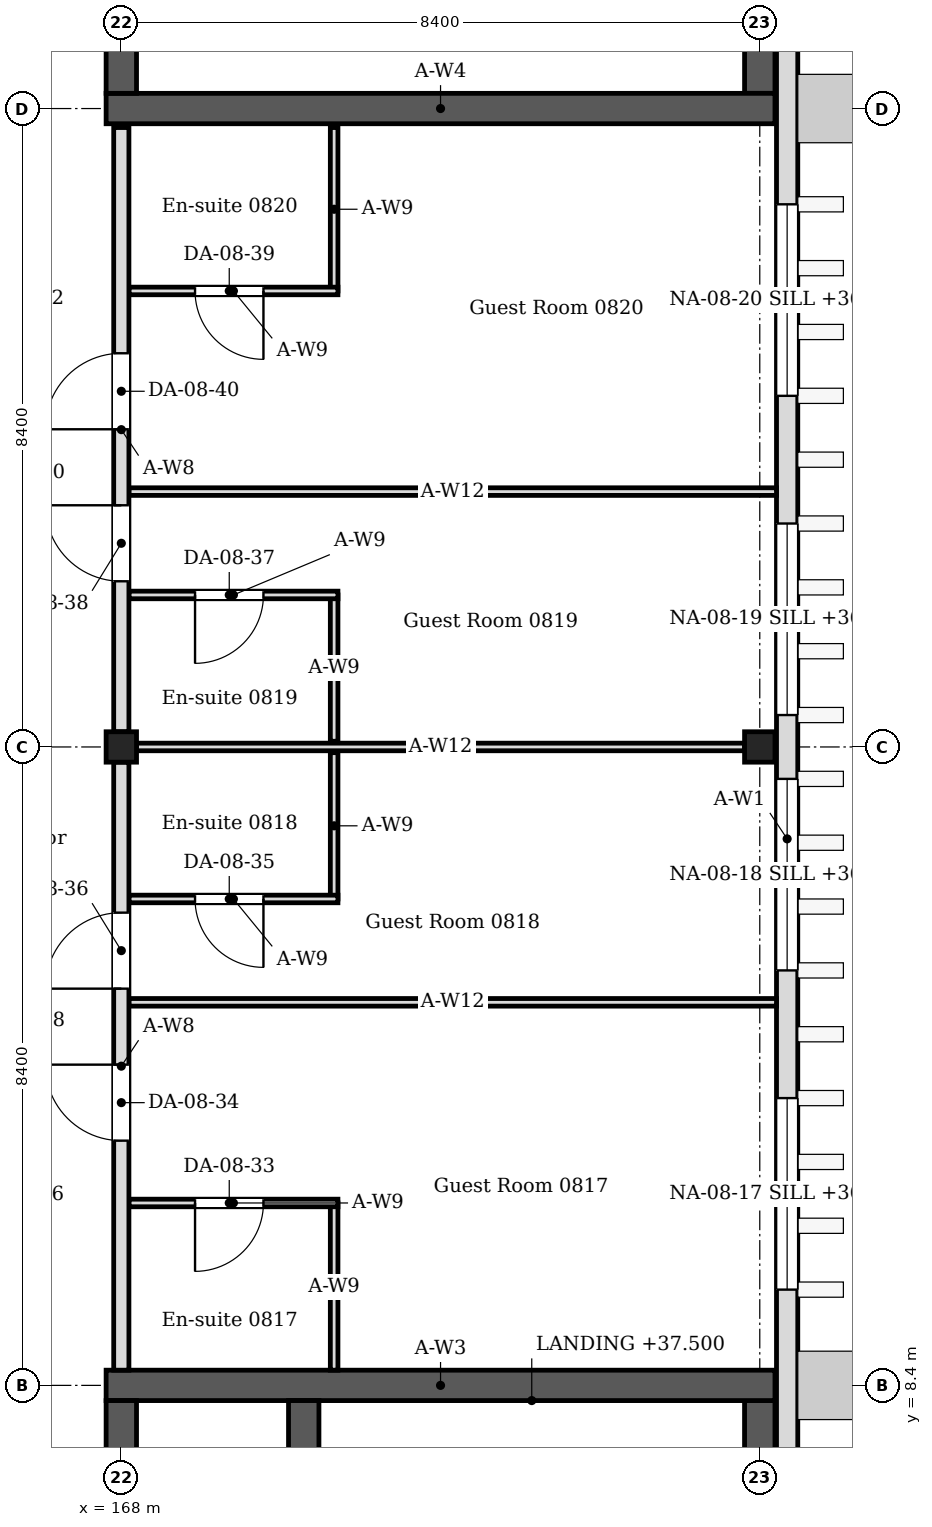
"""IFC4 building model, lengths in metres.
Left out: names, types, materials, properties, quantities, classifications, styles, units other than length and angle.
Written with IfcOpenShell. Run it as: python <this file> out.ifc"""

import sys

from ifc_helpers import new_model, si_unit, direction, frame, frame_2d, origin, origin_2d, place, context, subcontext, project, spatial, rectangle, i_section, extrude, element, fill, save


model = new_model("IFC4")
c1 = context("Model", 3, precision=1e-05, world=origin(), true_north=direction((0.0, 1.0)))
c2 = subcontext(c1, "Body", "Model", "MODEL_VIEW")
j1 = project(units=[si_unit("LENGTHUNIT", "METRE"), si_unit("PLANEANGLEUNIT", "RADIAN")], contexts=[c1])
p1 = place(None, origin())
s1 = spatial("IfcSite", under=j1, at=p1, CompositionType="ELEMENT")
p2 = place(p1, origin())
s2 = spatial("IfcBuilding", under=s1, at=p2, CompositionType="ELEMENT")
p3 = place(p2, frame((0.0, 0.0, 35.4)))
s3 = spatial("IfcBuildingStorey", under=s2, at=p3, CompositionType="ELEMENT", Elevation=35.4)
for number, where, z_axis, x_axis in (
    (1, (168.0, 16.8, 0.0), (0.0, 0.0, 1.0), (1.0, 0.0, 0.0)),
    (2, (176.4, 16.8, 0.0), (0.0, 0.0, 1.0), (1.0, 0.0, 0.0)),
):
    element("IfcColumn", number, at=place(p3, frame(where, z_axis=z_axis, x_axis=x_axis)), inside=s3, PredefinedType="COLUMN", context=c2, shape_type="SweptSolid", body=[
        extrude(i_section(OverallWidth=0.4, OverallDepth=0.4, WebThickness=0.013, FlangeThickness=0.021, FilletRadius=0.022, at=origin_2d()), origin(), (0.0, 0.0, 1.0), 4.2),
    ])
p4 = place(p3, frame((167.8, 8.4, 0.0), z_axis=(0.0, 0.0, 1.0), x_axis=(1.0, 0.0, 0.0)))
e3 = element("IfcWall", 3, at=p4, inside=s3, PredefinedType="SOLIDWALL", context=c2, shape_type="SweptSolid", body=[
    extrude(rectangle(XDim=8.8, YDim=0.4, at=frame_2d((4.4, 0.0))), origin(), (0.0, 0.0, 1.0), 4.05),
])
p5 = place(p3, frame((168.0, 0.2, 0.0), z_axis=(0.0, 0.0, 1.0), x_axis=(0.0, 1.0, 0.0)))
e4 = element("IfcWall", 4, at=p5, inside=s3, PredefinedType="SOLIDWALL", context=c2, shape_type="SweptSolid", body=[
    extrude(rectangle(XDim=8.0, YDim=0.4, at=frame_2d((4.0, 0.0))), origin(), (0.0, 0.0, 1.0), 4.05),
])
p6 = place(p5, frame((1.75, 0.0, 0.0)))
e5 = element("IfcOpeningElement", 5, at=p6, cuts=e4, PredefinedType="OPENING", context=c2, shape_type="SweptSolid", body=[
    extrude(rectangle(XDim=1.0, YDim=2.1, at=frame_2d((0.5, 1.05))), frame((0.0, 0.21, 0.0), z_axis=(0.0, -1.0, 0.0), x_axis=(1.0, 0.0, 0.0)), (0.0, 0.0, 1.0), 0.42),
])
p7 = place(p5, frame((5.675, 0.0, 0.0)))
e6 = element("IfcOpeningElement", 6, at=p7, cuts=e4, PredefinedType="OPENING", context=c2, shape_type="SweptSolid", body=[
    extrude(rectangle(XDim=1.05, YDim=2.1, at=frame_2d((0.525, 1.05))), frame((0.0, 0.21, 0.0), z_axis=(0.0, -1.0, 0.0), x_axis=(1.0, 0.0, 0.0)), (0.0, 0.0, 1.0), 0.42),
])
p8 = place(p3, frame((176.4, 0.2, 0.0), z_axis=(0.0, 0.0, 1.0), x_axis=(0.0, 1.0, 0.0)))
e7 = element("IfcWall", 7, at=p8, inside=s3, PredefinedType="SOLIDWALL", context=c2, shape_type="SweptSolid", body=[
    extrude(rectangle(XDim=8.0, YDim=0.4, at=frame_2d((4.0, 0.0))), origin(), (0.0, 0.0, 1.0), 4.05),
])
p9 = place(p3, frame((167.8, 25.2, 0.0), z_axis=(0.0, 0.0, 1.0), x_axis=(1.0, 0.0, 0.0)))
e8 = element("IfcWall", 8, at=p9, inside=s3, PredefinedType="SOLIDWALL", context=c2, shape_type="SweptSolid", body=[
    extrude(rectangle(XDim=8.8, YDim=0.4, at=frame_2d((4.4, 0.0))), origin(), (0.0, 0.0, 1.0), 4.05),
])
p10 = place(p3, frame((168.0, 25.4, 0.0), z_axis=(0.0, 0.0, 1.0), x_axis=(0.0, 1.0, 0.0)))
e9 = element("IfcWall", 9, at=p10, inside=s3, PredefinedType="SOLIDWALL", context=c2, shape_type="SweptSolid", body=[
    extrude(rectangle(XDim=16.4, YDim=0.4, at=frame_2d((8.2, 0.0))), origin(), (0.0, 0.0, 1.0), 4.05),
])
p11 = place(p10, frame((1.0, 0.0, 0.0)))
e10 = element("IfcOpeningElement", 10, at=p11, cuts=e9, PredefinedType="OPENING", context=c2, shape_type="SweptSolid", body=[
    extrude(rectangle(XDim=1.0, YDim=2.1, at=frame_2d((0.5, 1.05))), frame((0.0, 0.21, 0.0), z_axis=(0.0, -1.0, 0.0), x_axis=(1.0, 0.0, 0.0)), (0.0, 0.0, 1.0), 0.42),
])
p12 = place(p10, frame((14.4, 0.0, 0.0)))
e11 = element("IfcOpeningElement", 11, at=p12, cuts=e9, PredefinedType="OPENING", context=c2, shape_type="SweptSolid", body=[
    extrude(rectangle(XDim=1.4, YDim=2.1, at=frame_2d((0.7, 1.05))), frame((0.0, 0.21, 0.0), z_axis=(0.0, -1.0, 0.0), x_axis=(1.0, 0.0, 0.0)), (0.0, 0.0, 1.0), 0.42),
])
p13 = place(p3, frame((176.4, 25.4, 0.0), z_axis=(0.0, 0.0, 1.0), x_axis=(0.0, 1.0, 0.0)))
e12 = element("IfcWall", 12, at=p13, inside=s3, PredefinedType="SOLIDWALL", context=c2, shape_type="SweptSolid", body=[
    extrude(rectangle(XDim=16.4, YDim=0.4, at=frame_2d((8.2, 0.0))), origin(), (0.0, 0.0, 1.0), 4.05),
])
p14 = place(p3, frame((176.76, -0.22, 0.0), z_axis=(0.0, 0.0, 1.0), x_axis=(0.0, 1.0, 0.0)))
e13 = element("IfcWall", 13, at=p14, inside=s3, PredefinedType="SOLIDWALL", context=c2, shape_type="SweptSolid", body=[
    extrude(rectangle(XDim=42.57, YDim=0.28, at=frame_2d((21.285, 0.0))), origin(), (0.0, 0.0, 1.0), 4.05),
])
p15 = place(p14, frame((9.88, 0.0, 0.6)))
e14 = element("IfcOpeningElement", 14, at=p15, cuts=e13, PredefinedType="OPENING", context=c2, shape_type="SweptSolid", body=[
    extrude(rectangle(XDim=2.52, YDim=2.4, at=frame_2d((1.26, 1.2))), frame((0.0, 0.15, 0.0), z_axis=(0.0, -1.0, 0.0), x_axis=(1.0, 0.0, 0.0)), (0.0, 0.0, 1.0), 0.3),
])
p16 = place(p14, frame((14.08, 0.0, 0.6)))
e15 = element("IfcOpeningElement", 15, at=p16, cuts=e13, PredefinedType="OPENING", context=c2, shape_type="SweptSolid", body=[
    extrude(rectangle(XDim=2.52, YDim=2.4, at=frame_2d((1.26, 1.2))), frame((0.0, 0.15, 0.0), z_axis=(0.0, -1.0, 0.0), x_axis=(1.0, 0.0, 0.0)), (0.0, 0.0, 1.0), 0.3),
])
p17 = place(p14, frame((17.44, 0.0, 0.6)))
e16 = element("IfcOpeningElement", 16, at=p17, cuts=e13, PredefinedType="OPENING", context=c2, shape_type="SweptSolid", body=[
    extrude(rectangle(XDim=2.52, YDim=2.4, at=frame_2d((1.26, 1.2))), frame((0.0, 0.15, 0.0), z_axis=(0.0, -1.0, 0.0), x_axis=(1.0, 0.0, 0.0)), (0.0, 0.0, 1.0), 0.3),
])
p18 = place(p14, frame((21.64, 0.0, 0.6)))
e17 = element("IfcOpeningElement", 17, at=p18, cuts=e13, PredefinedType="OPENING", context=c2, shape_type="SweptSolid", body=[
    extrude(rectangle(XDim=2.52, YDim=2.4, at=frame_2d((1.26, 1.2))), frame((0.0, 0.15, 0.0), z_axis=(0.0, -1.0, 0.0), x_axis=(1.0, 0.0, 0.0)), (0.0, 0.0, 1.0), 0.3),
])
p19 = place(p3, frame((170.8, 8.6, 0.0), z_axis=(0.0, 0.0, 1.0), x_axis=(0.0, 1.0, 0.0)))
e18 = element("IfcWall", 18, at=p19, inside=s3, PredefinedType="PARTITIONING", context=c2, shape_type="SweptSolid", body=[
    extrude(rectangle(XDim=2.2, YDim=0.1, at=frame_2d((1.1, 0.0))), origin(), (0.0, 0.0, 1.0), 4.05),
])
p20 = place(p3, frame((170.85, 10.8, 0.0), z_axis=(0.0, 0.0, 1.0), x_axis=(-1.0, 0.0, 0.0)))
e19 = element("IfcWall", 19, at=p20, inside=s3, PredefinedType="PARTITIONING", context=c2, shape_type="SweptSolid", body=[
    extrude(rectangle(XDim=2.75, YDim=0.1, at=frame_2d((1.375, 0.0))), origin(), (0.0, 0.0, 1.0), 4.05),
])
p21 = place(p20, frame((0.98, 0.0, 0.0)))
e20 = element("IfcOpeningElement", 20, at=p21, cuts=e19, PredefinedType="OPENING", context=c2, shape_type="SweptSolid", body=[
    extrude(rectangle(XDim=0.9, YDim=2.1, at=frame_2d((0.45, 1.05))), frame((0.0, 0.06, 0.0), z_axis=(0.0, -1.0, 0.0), x_axis=(1.0, 0.0, 0.0)), (0.0, 0.0, 1.0), 0.12),
])
p22 = place(p3, frame((170.8, 14.8, 0.0), z_axis=(0.0, 0.0, 1.0), x_axis=(0.0, 1.0, 0.0)))
e21 = element("IfcWall", 21, at=p22, inside=s3, PredefinedType="PARTITIONING", context=c2, shape_type="SweptSolid", body=[
    extrude(rectangle(XDim=1.925, YDim=0.1, at=frame_2d((0.962, 0.0))), origin(), (0.0, 0.0, 1.0), 4.05),
])
p23 = place(p3, frame((170.85, 14.8, 0.0), z_axis=(0.0, 0.0, 1.0), x_axis=(-1.0, 0.0, 0.0)))
e22 = element("IfcWall", 22, at=p23, inside=s3, PredefinedType="PARTITIONING", context=c2, shape_type="SweptSolid", body=[
    extrude(rectangle(XDim=2.75, YDim=0.1, at=frame_2d((1.375, 0.0))), origin(), (0.0, 0.0, 1.0), 4.05),
])
p24 = place(p23, frame((0.98, 0.0, 0.0)))
e23 = element("IfcOpeningElement", 23, at=p24, cuts=e22, PredefinedType="OPENING", context=c2, shape_type="SweptSolid", body=[
    extrude(rectangle(XDim=0.9, YDim=2.1, at=frame_2d((0.45, 1.05))), frame((0.0, 0.06, 0.0), z_axis=(0.0, -1.0, 0.0), x_axis=(1.0, 0.0, 0.0)), (0.0, 0.0, 1.0), 0.12),
])
p25 = place(p3, frame((170.8, 16.875, 0.0), z_axis=(0.0, 0.0, 1.0), x_axis=(0.0, 1.0, 0.0)))
e24 = element("IfcWall", 24, at=p25, inside=s3, PredefinedType="PARTITIONING", context=c2, shape_type="SweptSolid", body=[
    extrude(rectangle(XDim=1.925, YDim=0.1, at=frame_2d((0.962, 0.0))), origin(), (0.0, 0.0, 1.0), 4.05),
])
p26 = place(p3, frame((170.85, 18.8, 0.0), z_axis=(0.0, 0.0, 1.0), x_axis=(-1.0, 0.0, 0.0)))
e25 = element("IfcWall", 25, at=p26, inside=s3, PredefinedType="PARTITIONING", context=c2, shape_type="SweptSolid", body=[
    extrude(rectangle(XDim=2.75, YDim=0.1, at=frame_2d((1.375, 0.0))), origin(), (0.0, 0.0, 1.0), 4.05),
])
p27 = place(p26, frame((0.98, 0.0, 0.0)))
e26 = element("IfcOpeningElement", 26, at=p27, cuts=e25, PredefinedType="OPENING", context=c2, shape_type="SweptSolid", body=[
    extrude(rectangle(XDim=0.9, YDim=2.1, at=frame_2d((0.45, 1.05))), frame((0.0, 0.06, 0.0), z_axis=(0.0, -1.0, 0.0), x_axis=(1.0, 0.0, 0.0)), (0.0, 0.0, 1.0), 0.12),
])
p28 = place(p3, frame((170.8, 22.8, 0.0), z_axis=(0.0, 0.0, 1.0), x_axis=(0.0, 1.0, 0.0)))
e27 = element("IfcWall", 27, at=p28, inside=s3, PredefinedType="PARTITIONING", context=c2, shape_type="SweptSolid", body=[
    extrude(rectangle(XDim=2.15, YDim=0.1, at=frame_2d((1.075, 0.0))), origin(), (0.0, 0.0, 1.0), 4.05),
])
p29 = place(p3, frame((170.85, 22.8, 0.0), z_axis=(0.0, 0.0, 1.0), x_axis=(-1.0, 0.0, 0.0)))
e28 = element("IfcWall", 28, at=p29, inside=s3, PredefinedType="PARTITIONING", context=c2, shape_type="SweptSolid", body=[
    extrude(rectangle(XDim=2.75, YDim=0.1, at=frame_2d((1.375, 0.0))), origin(), (0.0, 0.0, 1.0), 4.05),
])
p30 = place(p29, frame((0.98, 0.0, 0.0)))
e29 = element("IfcOpeningElement", 29, at=p30, cuts=e28, PredefinedType="OPENING", context=c2, shape_type="SweptSolid", body=[
    extrude(rectangle(XDim=0.9, YDim=2.1, at=frame_2d((0.45, 1.05))), frame((0.0, 0.06, 0.0), z_axis=(0.0, -1.0, 0.0), x_axis=(1.0, 0.0, 0.0)), (0.0, 0.0, 1.0), 0.12),
])
p31 = place(p3, frame((168.2, 16.8, 0.0), z_axis=(0.0, 0.0, 1.0), x_axis=(1.0, 0.0, 0.0)))
e30 = element("IfcWall", 30, at=p31, inside=s3, PredefinedType="PARTITIONING", context=c2, shape_type="SweptSolid", body=[
    extrude(rectangle(XDim=8.0, YDim=0.1, at=frame_2d((4.0, 0.0))), origin(), (0.0, 0.0, 1.0), 3.604),
])
for number, where, z_axis, x_axis in (
    (31, (168.1, 13.44, 0.0), (0.0, 0.0, 1.0), (1.0, 0.0, 0.0)),
    (32, (168.1, 20.16, 0.0), (0.0, 0.0, 1.0), (1.0, 0.0, 0.0)),
):
    element("IfcWall", number, at=place(p3, frame(where, z_axis=z_axis, x_axis=x_axis)), inside=s3, PredefinedType="PARTITIONING", context=c2, shape_type="SweptSolid", body=[
        extrude(rectangle(XDim=8.52, YDim=0.1, at=frame_2d((4.26, 0.0))), origin(), (0.0, 0.0, 1.0), 3.604),
    ])
p32 = place(p3, frame((168.0, 8.6, 0.0), z_axis=(0.0, 0.0, 1.0), x_axis=(0.0, 1.0, 0.0)))
e33 = element("IfcWall", 33, at=p32, inside=s3, PredefinedType="PARTITIONING", context=c2, shape_type="SweptSolid", body=[
    extrude(rectangle(XDim=8.0, YDim=0.2, at=frame_2d((4.0, 0.0))), origin(), (0.0, 0.0, 1.0), 3.45),
])
p33 = place(p32, frame((3.02, 0.0, 0.0)))
e34 = element("IfcOpeningElement", 34, at=p33, cuts=e33, PredefinedType="OPENING", context=c2, shape_type="SweptSolid", body=[
    extrude(rectangle(XDim=1.0, YDim=2.4, at=frame_2d((0.5, 1.2))), frame((0.0, 0.11, 0.0), z_axis=(0.0, -1.0, 0.0), x_axis=(1.0, 0.0, 0.0)), (0.0, 0.0, 1.0), 0.22),
])
p34 = place(p32, frame((5.02, 0.0, 0.0)))
e35 = element("IfcOpeningElement", 35, at=p34, cuts=e33, PredefinedType="OPENING", context=c2, shape_type="SweptSolid", body=[
    extrude(rectangle(XDim=1.0, YDim=2.4, at=frame_2d((0.5, 1.2))), frame((0.0, 0.11, 0.0), z_axis=(0.0, -1.0, 0.0), x_axis=(1.0, 0.0, 0.0)), (0.0, 0.0, 1.0), 0.22),
])
p35 = place(p3, frame((168.0, 17.0, 0.0), z_axis=(0.0, 0.0, 1.0), x_axis=(0.0, 1.0, 0.0)))
e36 = element("IfcWall", 36, at=p35, inside=s3, PredefinedType="PARTITIONING", context=c2, shape_type="SweptSolid", body=[
    extrude(rectangle(XDim=7.95, YDim=0.2, at=frame_2d((3.975, 0.0))), origin(), (0.0, 0.0, 1.0), 3.45),
])
p36 = place(p35, frame((1.98, 0.0, 0.0)))
e37 = element("IfcOpeningElement", 37, at=p36, cuts=e36, PredefinedType="OPENING", context=c2, shape_type="SweptSolid", body=[
    extrude(rectangle(XDim=1.0, YDim=2.4, at=frame_2d((0.5, 1.2))), frame((0.0, 0.11, 0.0), z_axis=(0.0, -1.0, 0.0), x_axis=(1.0, 0.0, 0.0)), (0.0, 0.0, 1.0), 0.22),
])
p37 = place(p35, frame((3.98, 0.0, 0.0)))
e38 = element("IfcOpeningElement", 38, at=p37, cuts=e36, PredefinedType="OPENING", context=c2, shape_type="SweptSolid", body=[
    extrude(rectangle(XDim=1.0, YDim=2.4, at=frame_2d((0.5, 1.2))), frame((0.0, 0.11, 0.0), z_axis=(0.0, -1.0, 0.0), x_axis=(1.0, 0.0, 0.0)), (0.0, 0.0, 1.0), 0.22),
])
p38 = place(p3, frame((170.4, 0.2, 0.0), z_axis=(0.0, 0.0, 1.0), x_axis=(0.0, 1.0, 0.0)))
e39 = element("IfcWall", 39, at=p38, inside=s3, PredefinedType="SOLIDWALL", context=c2, shape_type="SweptSolid", body=[
    extrude(rectangle(XDim=8.0, YDim=0.4, at=frame_2d((4.0, 0.0))), origin(), (0.0, 0.0, 1.0), 4.05),
])
p39 = place(p38, frame((0.3, 0.0, 0.0)))
e40 = element("IfcOpeningElement", 40, at=p39, cuts=e39, PredefinedType="OPENING", context=c2, shape_type="SweptSolid", body=[
    extrude(rectangle(XDim=0.9, YDim=2.1, at=frame_2d((0.45, 1.05))), frame((0.0, 0.21, 0.0), z_axis=(0.0, -1.0, 0.0), x_axis=(1.0, 0.0, 0.0)), (0.0, 0.0, 1.0), 0.42),
])
p40 = place(p15, origin())
e41 = element("IfcWindow", 41, at=p40, inside=s3, PartitioningType="SINGLE_PANEL", PredefinedType="WINDOW", context=c2, shape_type="SweptSolid", body=[
    extrude(rectangle(XDim=2.52, YDim=2.4, at=frame_2d((1.26, 1.2))), frame((0.0, 0.03, 0.0), z_axis=(0.0, -1.0, 0.0), x_axis=(1.0, 0.0, 0.0)), (0.0, 0.0, 1.0), 0.06),
])
fill(e14, e41)
p41 = place(p16, origin())
e42 = element("IfcWindow", 42, at=p41, inside=s3, PartitioningType="SINGLE_PANEL", PredefinedType="WINDOW", context=c2, shape_type="SweptSolid", body=[
    extrude(rectangle(XDim=2.52, YDim=2.4, at=frame_2d((1.26, 1.2))), frame((0.0, 0.03, 0.0), z_axis=(0.0, -1.0, 0.0), x_axis=(1.0, 0.0, 0.0)), (0.0, 0.0, 1.0), 0.06),
])
fill(e15, e42)
p42 = place(p17, origin())
e43 = element("IfcWindow", 43, at=p42, inside=s3, PartitioningType="SINGLE_PANEL", PredefinedType="WINDOW", context=c2, shape_type="SweptSolid", body=[
    extrude(rectangle(XDim=2.52, YDim=2.4, at=frame_2d((1.26, 1.2))), frame((0.0, 0.03, 0.0), z_axis=(0.0, -1.0, 0.0), x_axis=(1.0, 0.0, 0.0)), (0.0, 0.0, 1.0), 0.06),
])
fill(e16, e43)
p43 = place(p18, origin())
e44 = element("IfcWindow", 44, at=p43, inside=s3, PartitioningType="SINGLE_PANEL", PredefinedType="WINDOW", context=c2, shape_type="SweptSolid", body=[
    extrude(rectangle(XDim=2.52, YDim=2.4, at=frame_2d((1.26, 1.2))), frame((0.0, 0.03, 0.0), z_axis=(0.0, -1.0, 0.0), x_axis=(1.0, 0.0, 0.0)), (0.0, 0.0, 1.0), 0.06),
])
fill(e17, e44)
p44 = place(p21, origin())
e45 = element("IfcDoor", 45, at=p44, inside=s3, OperationType="SINGLE_SWING_RIGHT", PredefinedType="DOOR", context=c2, shape_type="SweptSolid", body=[
    extrude(rectangle(XDim=0.9, YDim=2.1, at=frame_2d((0.45, 1.05))), frame((0.0, 0.025, 0.0), z_axis=(0.0, -1.0, 0.0), x_axis=(1.0, 0.0, 0.0)), (0.0, 0.0, 1.0), 0.05),
])
fill(e20, e45)
p45 = place(p33, origin())
e46 = element("IfcDoor", 46, at=p45, inside=s3, OperationType="SINGLE_SWING_RIGHT", PredefinedType="DOOR", context=c2, shape_type="SweptSolid", body=[
    extrude(rectangle(XDim=1.0, YDim=2.4, at=frame_2d((0.5, 1.2))), frame((0.0, 0.025, 0.0), z_axis=(0.0, -1.0, 0.0), x_axis=(1.0, 0.0, 0.0)), (0.0, 0.0, 1.0), 0.05),
])
fill(e34, e46)
p46 = place(p24, origin())
e47 = element("IfcDoor", 47, at=p46, inside=s3, OperationType="SINGLE_SWING_LEFT", PredefinedType="DOOR", context=c2, shape_type="SweptSolid", body=[
    extrude(rectangle(XDim=0.9, YDim=2.1, at=frame_2d((0.45, 1.05))), frame((0.0, 0.025, 0.0), z_axis=(0.0, -1.0, 0.0), x_axis=(1.0, 0.0, 0.0)), (0.0, 0.0, 1.0), 0.05),
])
fill(e23, e47)
p47 = place(p34, origin())
e48 = element("IfcDoor", 48, at=p47, inside=s3, OperationType="SINGLE_SWING_LEFT", PredefinedType="DOOR", context=c2, shape_type="SweptSolid", body=[
    extrude(rectangle(XDim=1.0, YDim=2.4, at=frame_2d((0.5, 1.2))), frame((0.0, 0.025, 0.0), z_axis=(0.0, -1.0, 0.0), x_axis=(1.0, 0.0, 0.0)), (0.0, 0.0, 1.0), 0.05),
])
fill(e35, e48)
p48 = place(p27, origin())
e49 = element("IfcDoor", 49, at=p48, inside=s3, OperationType="SINGLE_SWING_RIGHT", PredefinedType="DOOR", context=c2, shape_type="SweptSolid", body=[
    extrude(rectangle(XDim=0.9, YDim=2.1, at=frame_2d((0.45, 1.05))), frame((0.0, 0.025, 0.0), z_axis=(0.0, -1.0, 0.0), x_axis=(1.0, 0.0, 0.0)), (0.0, 0.0, 1.0), 0.05),
])
fill(e26, e49)
p49 = place(p36, origin())
e50 = element("IfcDoor", 50, at=p49, inside=s3, OperationType="SINGLE_SWING_RIGHT", PredefinedType="DOOR", context=c2, shape_type="SweptSolid", body=[
    extrude(rectangle(XDim=1.0, YDim=2.4, at=frame_2d((0.5, 1.2))), frame((0.0, 0.025, 0.0), z_axis=(0.0, -1.0, 0.0), x_axis=(1.0, 0.0, 0.0)), (0.0, 0.0, 1.0), 0.05),
])
fill(e37, e50)
p50 = place(p30, origin())
e51 = element("IfcDoor", 51, at=p50, inside=s3, OperationType="SINGLE_SWING_LEFT", PredefinedType="DOOR", context=c2, shape_type="SweptSolid", body=[
    extrude(rectangle(XDim=0.9, YDim=2.1, at=frame_2d((0.45, 1.05))), frame((0.0, 0.025, 0.0), z_axis=(0.0, -1.0, 0.0), x_axis=(1.0, 0.0, 0.0)), (0.0, 0.0, 1.0), 0.05),
])
fill(e29, e51)
p51 = place(p37, origin())
e52 = element("IfcDoor", 52, at=p51, inside=s3, OperationType="SINGLE_SWING_LEFT", PredefinedType="DOOR", context=c2, shape_type="SweptSolid", body=[
    extrude(rectangle(XDim=1.0, YDim=2.4, at=frame_2d((0.5, 1.2))), frame((0.0, 0.025, 0.0), z_axis=(0.0, -1.0, 0.0), x_axis=(1.0, 0.0, 0.0)), (0.0, 0.0, 1.0), 0.05),
])
fill(e38, e52)
save(model, sys.argv[1])
